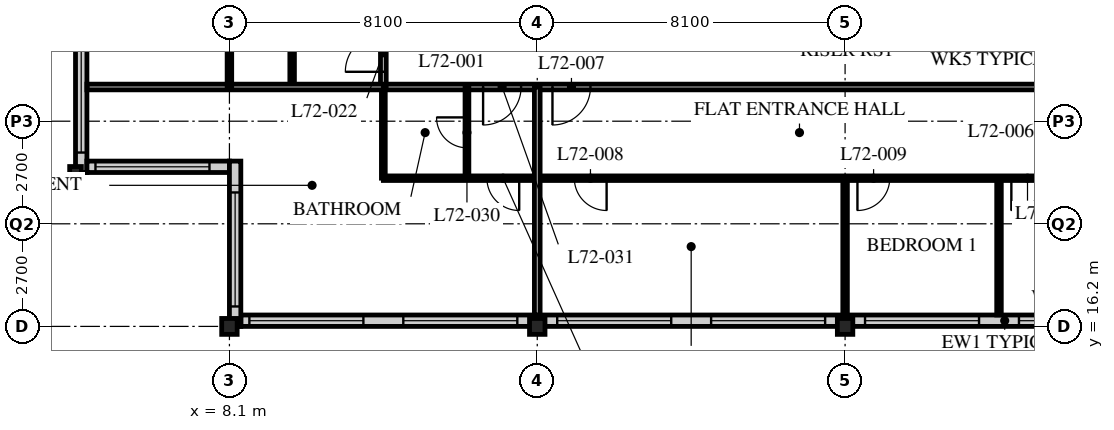
"""IFC4 building model, lengths in metres.
Left out: names, types, materials, properties, quantities, classifications, styles, units other than length and angle.
Written with IfcOpenShell. Run it as: python <this file> out.ifc"""

import sys

from ifc_helpers import new_model, si_unit, direction, frame, frame_2d, origin, origin_2d, place, context, subcontext, project, spatial, rectangle, i_section, extrude, element, fill, save


model = new_model("IFC4")
c1 = context("Model", 3, precision=1e-05, world=origin(), true_north=direction((0.0, 1.0)))
c2 = subcontext(c1, "Body", "Model", "MODEL_VIEW")
j1 = project(units=[si_unit("LENGTHUNIT", "METRE"), si_unit("PLANEANGLEUNIT", "RADIAN")], contexts=[c1])
p1 = place(None, origin())
s1 = spatial("IfcSite", under=j1, at=p1, CompositionType="ELEMENT")
p2 = place(p1, origin())
s2 = spatial("IfcBuilding", under=s1, at=p2, CompositionType="ELEMENT")
p3 = place(p2, frame((0.0, 0.0, 281.4)))
s3 = spatial("IfcBuildingStorey", under=s2, at=p3, CompositionType="ELEMENT", Elevation=281.4)
p4 = place(p3, frame((4.05, 20.25, 0.0), z_axis=(0.0, 0.0, 1.0), x_axis=(1.0, 0.0, 0.0)))
e1 = element("IfcColumn", 1, at=p4, inside=s3, PredefinedType="COLUMN", context=c2, shape_type="SweptSolid", body=[
    extrude(i_section(OverallWidth=0.307, OverallDepth=0.314, WebThickness=0.012, FlangeThickness=0.019, FilletRadius=0.015, at=origin_2d()), origin(), (0.0, 0.0, 1.0), 3.9),
])
for number, where, z_axis, x_axis in (
    (2, (8.1, 16.2, 0.0), (0.0, 0.0, 1.0), (1.0, 0.0, 0.0)),
    (3, (16.2, 16.2, 0.0), (0.0, 0.0, 1.0), (1.0, 0.0, 0.0)),
    (4, (24.3, 16.2, 0.0), (0.0, 0.0, 1.0), (1.0, 0.0, 0.0)),
):
    element("IfcColumn", number, at=place(p3, frame(where, z_axis=z_axis, x_axis=x_axis)), inside=s3, PredefinedType="COLUMN", context=c2, shape_type="SweptSolid", body=[
        extrude(i_section(OverallWidth=0.407, OverallDepth=0.419, WebThickness=0.031, FlangeThickness=0.049, FilletRadius=0.015, at=origin_2d()), origin(), (0.0, 0.0, 1.0), 3.9),
    ])
p5 = place(p3, frame((8.4, 16.35, 0.0), z_axis=(0.0, 0.0, 1.0), x_axis=(1.0, 0.0, 0.0)))
e5 = element("IfcWall", 5, at=p5, inside=s3, PredefinedType="SOLIDWALL", context=c2, shape_type="SweptSolid", body=[
    extrude(rectangle(XDim=40.2, YDim=0.3, at=frame_2d((20.1, 0.0))), origin(), (0.0, 0.0, 1.0), 3.69),
])
p6 = place(p5, frame((0.225, 0.0, 0.6)))
e6 = element("IfcOpeningElement", 6, at=p6, cuts=e5, PredefinedType="OPENING", context=c2, shape_type="SweptSolid", body=[
    extrude(rectangle(XDim=3.0, YDim=2.4, at=frame_2d((1.5, 1.2))), frame((0.0, 0.16, 0.0), z_axis=(0.0, -1.0, 0.0), x_axis=(1.0, 0.0, 0.0)), (0.0, 0.0, 1.0), 0.32),
])
p7 = place(p5, frame((4.275, 0.0, 0.6)))
e7 = element("IfcOpeningElement", 7, at=p7, cuts=e5, PredefinedType="OPENING", context=c2, shape_type="SweptSolid", body=[
    extrude(rectangle(XDim=3.0, YDim=2.4, at=frame_2d((1.5, 1.2))), frame((0.0, 0.16, 0.0), z_axis=(0.0, -1.0, 0.0), x_axis=(1.0, 0.0, 0.0)), (0.0, 0.0, 1.0), 0.32),
])
p8 = place(p5, frame((8.325, 0.0, 0.6)))
e8 = element("IfcOpeningElement", 8, at=p8, cuts=e5, PredefinedType="OPENING", context=c2, shape_type="SweptSolid", body=[
    extrude(rectangle(XDim=3.0, YDim=2.4, at=frame_2d((1.5, 1.2))), frame((0.0, 0.16, 0.0), z_axis=(0.0, -1.0, 0.0), x_axis=(1.0, 0.0, 0.0)), (0.0, 0.0, 1.0), 0.32),
])
p9 = place(p5, frame((12.375, 0.0, 0.6)))
e9 = element("IfcOpeningElement", 9, at=p9, cuts=e5, PredefinedType="OPENING", context=c2, shape_type="SweptSolid", body=[
    extrude(rectangle(XDim=3.0, YDim=2.4, at=frame_2d((1.5, 1.2))), frame((0.0, 0.16, 0.0), z_axis=(0.0, -1.0, 0.0), x_axis=(1.0, 0.0, 0.0)), (0.0, 0.0, 1.0), 0.32),
])
p10 = place(p5, frame((16.425, 0.0, 0.6)))
e10 = element("IfcOpeningElement", 10, at=p10, cuts=e5, PredefinedType="OPENING", context=c2, shape_type="SweptSolid", body=[
    extrude(rectangle(XDim=3.0, YDim=2.4, at=frame_2d((1.5, 1.2))), frame((0.0, 0.16, 0.0), z_axis=(0.0, -1.0, 0.0), x_axis=(1.0, 0.0, 0.0)), (0.0, 0.0, 1.0), 0.32),
])
p11 = place(p5, frame((20.475, 0.0, 0.6)))
e11 = element("IfcOpeningElement", 11, at=p11, cuts=e5, PredefinedType="OPENING", context=c2, shape_type="SweptSolid", body=[
    extrude(rectangle(XDim=3.0, YDim=2.4, at=frame_2d((1.5, 1.2))), frame((0.0, 0.16, 0.0), z_axis=(0.0, -1.0, 0.0), x_axis=(1.0, 0.0, 0.0)), (0.0, 0.0, 1.0), 0.32),
])
p12 = place(p5, frame((24.525, 0.0, 0.6)))
e12 = element("IfcOpeningElement", 12, at=p12, cuts=e5, PredefinedType="OPENING", context=c2, shape_type="SweptSolid", body=[
    extrude(rectangle(XDim=3.0, YDim=2.4, at=frame_2d((1.5, 1.2))), frame((0.0, 0.16, 0.0), z_axis=(0.0, -1.0, 0.0), x_axis=(1.0, 0.0, 0.0)), (0.0, 0.0, 1.0), 0.32),
])
p13 = place(p5, frame((28.575, 0.0, 0.6)))
e13 = element("IfcOpeningElement", 13, at=p13, cuts=e5, PredefinedType="OPENING", context=c2, shape_type="SweptSolid", body=[
    extrude(rectangle(XDim=3.0, YDim=2.4, at=frame_2d((1.5, 1.2))), frame((0.0, 0.16, 0.0), z_axis=(0.0, -1.0, 0.0), x_axis=(1.0, 0.0, 0.0)), (0.0, 0.0, 1.0), 0.32),
])
p14 = place(p5, frame((32.625, 0.0, 0.6)))
e14 = element("IfcOpeningElement", 14, at=p14, cuts=e5, PredefinedType="OPENING", context=c2, shape_type="SweptSolid", body=[
    extrude(rectangle(XDim=3.0, YDim=2.4, at=frame_2d((1.5, 1.2))), frame((0.0, 0.16, 0.0), z_axis=(0.0, -1.0, 0.0), x_axis=(1.0, 0.0, 0.0)), (0.0, 0.0, 1.0), 0.32),
])
p15 = place(p5, frame((36.675, 0.0, 0.6)))
e15 = element("IfcOpeningElement", 15, at=p15, cuts=e5, PredefinedType="OPENING", context=c2, shape_type="SweptSolid", body=[
    extrude(rectangle(XDim=3.0, YDim=2.4, at=frame_2d((1.5, 1.2))), frame((0.0, 0.16, 0.0), z_axis=(0.0, -1.0, 0.0), x_axis=(1.0, 0.0, 0.0)), (0.0, 0.0, 1.0), 0.32),
])
p16 = place(p3, frame((4.2, 24.6, 0.0), z_axis=(0.0, 0.0, 1.0), x_axis=(0.0, -1.0, 0.0)))
e16 = element("IfcWall", 16, at=p16, inside=s3, PredefinedType="SOLIDWALL", context=c2, shape_type="SweptSolid", body=[
    extrude(rectangle(XDim=4.35, YDim=0.3, at=frame_2d((2.175, 0.0))), origin(), (0.0, 0.0, 1.0), 3.69),
])
p17 = place(p16, frame((0.825, 0.0, 0.6)))
e17 = element("IfcOpeningElement", 17, at=p17, cuts=e16, PredefinedType="OPENING", context=c2, shape_type="SweptSolid", body=[
    extrude(rectangle(XDim=3.0, YDim=2.3, at=frame_2d((1.5, 1.15))), frame((0.0, 0.16, 0.0), z_axis=(0.0, -1.0, 0.0), x_axis=(1.0, 0.0, 0.0)), (0.0, 0.0, 1.0), 0.32),
])
p18 = place(p3, frame((4.35, 20.4, 0.0), z_axis=(0.0, 0.0, 1.0), x_axis=(1.0, 0.0, 0.0)))
e18 = element("IfcWall", 18, at=p18, inside=s3, PredefinedType="SOLIDWALL", context=c2, shape_type="SweptSolid", body=[
    extrude(rectangle(XDim=3.75, YDim=0.3, at=frame_2d((1.875, 0.0))), origin(), (0.0, 0.0, 1.0), 3.69),
])
p19 = place(p18, frame((0.225, 0.0, 0.6)))
e19 = element("IfcOpeningElement", 19, at=p19, cuts=e18, PredefinedType="OPENING", context=c2, shape_type="SweptSolid", body=[
    extrude(rectangle(XDim=3.0, YDim=2.3, at=frame_2d((1.5, 1.15))), frame((0.0, 0.16, 0.0), z_axis=(0.0, -1.0, 0.0), x_axis=(1.0, 0.0, 0.0)), (0.0, 0.0, 1.0), 0.32),
])
p20 = place(p3, frame((8.25, 20.55, 0.0), z_axis=(0.0, 0.0, 1.0), x_axis=(0.0, -1.0, 0.0)))
e20 = element("IfcWall", 20, at=p20, inside=s3, PredefinedType="SOLIDWALL", context=c2, shape_type="SweptSolid", body=[
    extrude(rectangle(XDim=4.35, YDim=0.3, at=frame_2d((2.175, 0.0))), origin(), (0.0, 0.0, 1.0), 3.69),
])
p21 = place(p20, frame((0.825, 0.0, 0.6)))
e21 = element("IfcOpeningElement", 21, at=p21, cuts=e20, PredefinedType="OPENING", context=c2, shape_type="SweptSolid", body=[
    extrude(rectangle(XDim=3.0, YDim=2.3, at=frame_2d((1.5, 1.15))), frame((0.0, 0.16, 0.0), z_axis=(0.0, -1.0, 0.0), x_axis=(1.0, 0.0, 0.0)), (0.0, 0.0, 1.0), 0.32),
])
p22 = place(p3, frame((12.15, 22.5, 0.0), z_axis=(0.0, 0.0, 1.0), x_axis=(1.0, 0.0, 0.0)))
e22 = element("IfcWall", 22, at=p22, inside=s3, PredefinedType="PARTITIONING", context=c2, shape_type="SweptSolid", body=[
    extrude(rectangle(XDim=24.3, YDim=0.15, at=frame_2d((12.15, 0.0))), origin(), (0.0, 0.0, 1.0), 3.69),
])
p23 = place(p22, frame((4.45, 0.0, 0.0)))
e23 = element("IfcOpeningElement", 23, at=p23, cuts=e22, PredefinedType="OPENING", context=c2, shape_type="SweptSolid", body=[
    extrude(rectangle(XDim=1.0, YDim=2.1, at=frame_2d((0.5, 1.05))), frame((0.0, 0.085, 0.0), z_axis=(0.0, -1.0, 0.0), x_axis=(1.0, 0.0, 0.0)), (0.0, 0.0, 1.0), 0.17),
])
p24 = place(p22, frame((22.6, 0.0, 0.0)))
e24 = element("IfcOpeningElement", 24, at=p24, cuts=e22, PredefinedType="OPENING", context=c2, shape_type="SweptSolid", body=[
    extrude(rectangle(XDim=1.0, YDim=2.1, at=frame_2d((0.5, 1.05))), frame((0.0, 0.085, 0.0), z_axis=(0.0, -1.0, 0.0), x_axis=(1.0, 0.0, 0.0)), (0.0, 0.0, 1.0), 0.17),
])
p25 = place(p22, frame((2.625, 0.0, 0.0)))
e25 = element("IfcOpeningElement", 25, at=p25, cuts=e22, PredefinedType="OPENING", context=c2, shape_type="SweptSolid", body=[
    extrude(rectangle(XDim=1.0, YDim=2.1, at=frame_2d((0.5, 1.05))), frame((0.0, 0.085, 0.0), z_axis=(0.0, -1.0, 0.0), x_axis=(1.0, 0.0, 0.0)), (0.0, 0.0, 1.0), 0.17),
])
p26 = place(p3, frame((12.15, 22.5, 0.0), z_axis=(0.0, 0.0, 1.0), x_axis=(0.0, 1.0, 0.0)))
e26 = element("IfcWall", 26, at=p26, inside=s3, PredefinedType="PARTITIONING", context=c2, shape_type="SweptSolid", body=[
    extrude(rectangle(XDim=26.1, YDim=0.15, at=frame_2d((13.05, 0.0))), origin(), (0.0, 0.0, 1.0), 3.69),
])
p27 = place(p26, frame((0.4, 0.0, 0.0)))
e27 = element("IfcOpeningElement", 27, at=p27, cuts=e26, PredefinedType="OPENING", context=c2, shape_type="SweptSolid", body=[
    extrude(rectangle(XDim=1.0, YDim=2.1, at=frame_2d((0.5, 1.05))), frame((0.0, 0.085, 0.0), z_axis=(0.0, -1.0, 0.0), x_axis=(1.0, 0.0, 0.0)), (0.0, 0.0, 1.0), 0.17),
])
p28 = place(p3, frame((24.3, 20.1, 0.0), z_axis=(0.0, 0.0, 1.0), x_axis=(0.0, -1.0, 0.0)))
e28 = element("IfcWall", 28, at=p28, inside=s3, PredefinedType="PARTITIONING", context=c2, shape_type="SweptSolid", body=[
    extrude(rectangle(XDim=3.6, YDim=0.12, at=frame_2d((1.8, 0.0))), origin(), (0.0, 0.0, 1.0), 3.078),
])
p29 = place(p3, frame((28.35, 20.1, 0.0), z_axis=(0.0, 0.0, 1.0), x_axis=(0.0, -1.0, 0.0)))
e29 = element("IfcWall", 29, at=p29, inside=s3, PredefinedType="PARTITIONING", context=c2, shape_type="SweptSolid", body=[
    extrude(rectangle(XDim=3.6, YDim=0.12, at=frame_2d((1.8, 0.0))), origin(), (0.0, 0.0, 1.0), 3.69),
])
p30 = place(p3, frame((9.75, 22.5, 0.0), z_axis=(0.0, 0.0, 1.0), x_axis=(0.0, 1.0, 0.0)))
e30 = element("IfcWall", 30, at=p30, inside=s3, PredefinedType="PARTITIONING", context=c2, shape_type="SweptSolid", body=[
    extrude(rectangle(XDim=26.1, YDim=0.12, at=frame_2d((13.05, 0.0))), origin(), (0.0, 0.0, 1.0), 3.69),
])
p31 = place(p30, frame((0.975, 0.0, 0.0)))
e31 = element("IfcOpeningElement", 31, at=p31, cuts=e30, PredefinedType="OPENING", context=c2, shape_type="SweptSolid", body=[
    extrude(rectangle(XDim=0.85, YDim=2.1, at=frame_2d((0.425, 1.05))), frame((0.0, 0.07, 0.0), z_axis=(0.0, -1.0, 0.0), x_axis=(1.0, 0.0, 0.0)), (0.0, 0.0, 1.0), 0.14),
])
p32 = place(p30, frame((10.225, 0.0, 0.0)))
e32 = element("IfcOpeningElement", 32, at=p32, cuts=e30, PredefinedType="OPENING", context=c2, shape_type="SweptSolid", body=[
    extrude(rectangle(XDim=0.85, YDim=2.1, at=frame_2d((0.425, 1.05))), frame((0.0, 0.07, 0.0), z_axis=(0.0, -1.0, 0.0), x_axis=(1.0, 0.0, 0.0)), (0.0, 0.0, 1.0), 0.14),
])
p33 = place(p30, frame((14.275, 0.0, 0.0)))
e33 = element("IfcOpeningElement", 33, at=p33, cuts=e30, PredefinedType="OPENING", context=c2, shape_type="SweptSolid", body=[
    extrude(rectangle(XDim=0.85, YDim=2.1, at=frame_2d((0.425, 1.05))), frame((0.0, 0.07, 0.0), z_axis=(0.0, -1.0, 0.0), x_axis=(1.0, 0.0, 0.0)), (0.0, 0.0, 1.0), 0.14),
])
p34 = place(p30, frame((18.325, 0.0, 0.0)))
e34 = element("IfcOpeningElement", 34, at=p34, cuts=e30, PredefinedType="OPENING", context=c2, shape_type="SweptSolid", body=[
    extrude(rectangle(XDim=0.85, YDim=2.1, at=frame_2d((0.425, 1.05))), frame((0.0, 0.07, 0.0), z_axis=(0.0, -1.0, 0.0), x_axis=(1.0, 0.0, 0.0)), (0.0, 0.0, 1.0), 0.14),
])
p35 = place(p30, frame((22.375, 0.0, 0.0)))
e35 = element("IfcOpeningElement", 35, at=p35, cuts=e30, PredefinedType="OPENING", context=c2, shape_type="SweptSolid", body=[
    extrude(rectangle(XDim=0.85, YDim=2.1, at=frame_2d((0.425, 1.05))), frame((0.0, 0.07, 0.0), z_axis=(0.0, -1.0, 0.0), x_axis=(1.0, 0.0, 0.0)), (0.0, 0.0, 1.0), 0.14),
])
p36 = place(p3, frame((12.15, 20.1, 0.0), z_axis=(0.0, 0.0, 1.0), x_axis=(1.0, 0.0, 0.0)))
e36 = element("IfcWall", 36, at=p36, inside=s3, PredefinedType="PARTITIONING", context=c2, shape_type="SweptSolid", body=[
    extrude(rectangle(XDim=20.25, YDim=0.12, at=frame_2d((10.125, 0.0))), origin(), (0.0, 0.0, 1.0), 3.69),
])
p37 = place(p36, frame((5.025, 0.0, 0.0)))
e37 = element("IfcOpeningElement", 37, at=p37, cuts=e36, PredefinedType="OPENING", context=c2, shape_type="SweptSolid", body=[
    extrude(rectangle(XDim=0.85, YDim=2.1, at=frame_2d((0.425, 1.05))), frame((0.0, 0.07, 0.0), z_axis=(0.0, -1.0, 0.0), x_axis=(1.0, 0.0, 0.0)), (0.0, 0.0, 1.0), 0.14),
])
p38 = place(p36, frame((12.475, 0.0, 0.0)))
e38 = element("IfcOpeningElement", 38, at=p38, cuts=e36, PredefinedType="OPENING", context=c2, shape_type="SweptSolid", body=[
    extrude(rectangle(XDim=0.85, YDim=2.1, at=frame_2d((0.425, 1.05))), frame((0.0, 0.07, 0.0), z_axis=(0.0, -1.0, 0.0), x_axis=(1.0, 0.0, 0.0)), (0.0, 0.0, 1.0), 0.14),
])
p39 = place(p36, frame((16.525, 0.0, 0.0)))
e39 = element("IfcOpeningElement", 39, at=p39, cuts=e36, PredefinedType="OPENING", context=c2, shape_type="SweptSolid", body=[
    extrude(rectangle(XDim=0.85, YDim=2.1, at=frame_2d((0.425, 1.05))), frame((0.0, 0.07, 0.0), z_axis=(0.0, -1.0, 0.0), x_axis=(1.0, 0.0, 0.0)), (0.0, 0.0, 1.0), 0.14),
])
p40 = place(p36, frame((2.725, 0.0, 0.0)))
e40 = element("IfcOpeningElement", 40, at=p40, cuts=e36, PredefinedType="OPENING", context=c2, shape_type="SweptSolid", body=[
    extrude(rectangle(XDim=0.85, YDim=2.1, at=frame_2d((0.425, 1.05))), frame((0.0, 0.07, 0.0), z_axis=(0.0, -1.0, 0.0), x_axis=(1.0, 0.0, 0.0)), (0.0, 0.0, 1.0), 0.14),
])
p41 = place(p3, frame((14.35, 22.5, 0.0), z_axis=(0.0, 0.0, 1.0), x_axis=(0.0, -1.0, 0.0)))
e41 = element("IfcWall", 41, at=p41, inside=s3, PredefinedType="PARTITIONING", context=c2, shape_type="SweptSolid", body=[
    extrude(rectangle(XDim=2.4, YDim=0.1, at=frame_2d((1.2, 0.0))), origin(), (0.0, 0.0, 1.0), 3.69),
])
p42 = place(p41, frame((0.8, 0.0, 0.0)))
e42 = element("IfcOpeningElement", 42, at=p42, cuts=e41, PredefinedType="OPENING", context=c2, shape_type="SweptSolid", body=[
    extrude(rectangle(XDim=0.8, YDim=2.1, at=frame_2d((0.4, 1.05))), frame((0.0, 0.06, 0.0), z_axis=(0.0, -1.0, 0.0), x_axis=(1.0, 0.0, 0.0)), (0.0, 0.0, 1.0), 0.12),
])
p43 = place(p3, frame((12.15, 22.5, 0.0), z_axis=(0.0, 0.0, 1.0), x_axis=(0.0, -1.0, 0.0)))
e43 = element("IfcWall", 43, at=p43, inside=s3, PredefinedType="PARTITIONING", context=c2, shape_type="SweptSolid", body=[
    extrude(rectangle(XDim=2.4, YDim=0.1, at=frame_2d((1.2, 0.0))), origin(), (0.0, 0.0, 1.0), 3.69),
])
p44 = place(p3, frame((4.35, 22.5, 0.0), z_axis=(0.0, 0.0, 1.0), x_axis=(1.0, 0.0, 0.0)))
e44 = element("IfcWall", 44, at=p44, inside=s3, PredefinedType="PARTITIONING", context=c2, shape_type="SweptSolid", body=[
    extrude(rectangle(XDim=7.8, YDim=0.15, at=frame_2d((3.9, 0.0))), origin(), (0.0, 0.0, 1.0), 3.69),
])
p45 = place(p3, frame((16.2, 22.5, 0.0), z_axis=(0.0, 0.0, 1.0), x_axis=(0.0, -1.0, 0.0)))
e45 = element("IfcWall", 45, at=p45, inside=s3, PredefinedType="PARTITIONING", context=c2, shape_type="SweptSolid", body=[
    extrude(rectangle(XDim=6.0, YDim=0.15, at=frame_2d((3.0, 0.0))), origin(), (0.0, 0.0, 1.0), 3.078),
])
p46 = place(p3, frame((8.1, 22.5, 0.0), z_axis=(0.0, 0.0, 1.0), x_axis=(0.0, 1.0, 0.0)))
e46 = element("IfcWall", 46, at=p46, inside=s3, PredefinedType="PARTITIONING", context=c2, shape_type="SweptSolid", body=[
    extrude(rectangle(XDim=1.597, YDim=0.12, at=frame_2d((0.798, 0.0))), origin(), (0.0, 0.0, 1.0), 3.078),
])
p47 = place(p6, origin())
e47 = element("IfcWindow", 47, at=p47, inside=s3, PartitioningType="SINGLE_PANEL", PredefinedType="WINDOW", context=c2, shape_type="SweptSolid", body=[
    extrude(rectangle(XDim=3.0, YDim=2.4, at=frame_2d((1.5, 1.2))), frame((0.0, 0.03, 0.0), z_axis=(0.0, -1.0, 0.0), x_axis=(1.0, 0.0, 0.0)), (0.0, 0.0, 1.0), 0.06),
])
fill(e6, e47)
p48 = place(p7, origin())
e48 = element("IfcWindow", 48, at=p48, inside=s3, PartitioningType="SINGLE_PANEL", PredefinedType="WINDOW", context=c2, shape_type="SweptSolid", body=[
    extrude(rectangle(XDim=3.0, YDim=2.4, at=frame_2d((1.5, 1.2))), frame((0.0, 0.03, 0.0), z_axis=(0.0, -1.0, 0.0), x_axis=(1.0, 0.0, 0.0)), (0.0, 0.0, 1.0), 0.06),
])
fill(e7, e48)
p49 = place(p8, origin())
e49 = element("IfcWindow", 49, at=p49, inside=s3, PartitioningType="SINGLE_PANEL", PredefinedType="WINDOW", context=c2, shape_type="SweptSolid", body=[
    extrude(rectangle(XDim=3.0, YDim=2.4, at=frame_2d((1.5, 1.2))), frame((0.0, 0.03, 0.0), z_axis=(0.0, -1.0, 0.0), x_axis=(1.0, 0.0, 0.0)), (0.0, 0.0, 1.0), 0.06),
])
fill(e8, e49)
p50 = place(p9, origin())
e50 = element("IfcWindow", 50, at=p50, inside=s3, PartitioningType="SINGLE_PANEL", PredefinedType="WINDOW", context=c2, shape_type="SweptSolid", body=[
    extrude(rectangle(XDim=3.0, YDim=2.4, at=frame_2d((1.5, 1.2))), frame((0.0, 0.03, 0.0), z_axis=(0.0, -1.0, 0.0), x_axis=(1.0, 0.0, 0.0)), (0.0, 0.0, 1.0), 0.06),
])
fill(e9, e50)
p51 = place(p10, origin())
e51 = element("IfcWindow", 51, at=p51, inside=s3, PartitioningType="SINGLE_PANEL", PredefinedType="WINDOW", context=c2, shape_type="SweptSolid", body=[
    extrude(rectangle(XDim=3.0, YDim=2.4, at=frame_2d((1.5, 1.2))), frame((0.0, 0.03, 0.0), z_axis=(0.0, -1.0, 0.0), x_axis=(1.0, 0.0, 0.0)), (0.0, 0.0, 1.0), 0.06),
])
fill(e10, e51)
p52 = place(p11, origin())
e52 = element("IfcWindow", 52, at=p52, inside=s3, PartitioningType="SINGLE_PANEL", PredefinedType="WINDOW", context=c2, shape_type="SweptSolid", body=[
    extrude(rectangle(XDim=3.0, YDim=2.4, at=frame_2d((1.5, 1.2))), frame((0.0, 0.03, 0.0), z_axis=(0.0, -1.0, 0.0), x_axis=(1.0, 0.0, 0.0)), (0.0, 0.0, 1.0), 0.06),
])
fill(e11, e52)
p53 = place(p17, origin())
e53 = element("IfcWindow", 53, at=p53, inside=s3, PartitioningType="SINGLE_PANEL", PredefinedType="WINDOW", context=c2, shape_type="SweptSolid", body=[
    extrude(rectangle(XDim=3.0, YDim=2.3, at=frame_2d((1.5, 1.15))), frame((0.0, 0.03, 0.0), z_axis=(0.0, -1.0, 0.0), x_axis=(1.0, 0.0, 0.0)), (0.0, 0.0, 1.0), 0.06),
])
fill(e17, e53)
p54 = place(p19, origin())
e54 = element("IfcWindow", 54, at=p54, inside=s3, PartitioningType="SINGLE_PANEL", PredefinedType="WINDOW", context=c2, shape_type="SweptSolid", body=[
    extrude(rectangle(XDim=3.0, YDim=2.3, at=frame_2d((1.5, 1.15))), frame((0.0, 0.03, 0.0), z_axis=(0.0, -1.0, 0.0), x_axis=(1.0, 0.0, 0.0)), (0.0, 0.0, 1.0), 0.06),
])
fill(e19, e54)
p55 = place(p21, origin())
e55 = element("IfcWindow", 55, at=p55, inside=s3, PartitioningType="SINGLE_PANEL", PredefinedType="WINDOW", context=c2, shape_type="SweptSolid", body=[
    extrude(rectangle(XDim=3.0, YDim=2.3, at=frame_2d((1.5, 1.15))), frame((0.0, 0.03, 0.0), z_axis=(0.0, -1.0, 0.0), x_axis=(1.0, 0.0, 0.0)), (0.0, 0.0, 1.0), 0.06),
])
fill(e21, e55)
p56 = place(p23, origin())
e56 = element("IfcDoor", 56, at=p56, inside=s3, OperationType="SINGLE_SWING_RIGHT", PredefinedType="DOOR", context=c2, shape_type="SweptSolid", body=[
    extrude(rectangle(XDim=1.0, YDim=2.1, at=frame_2d((0.5, 1.05))), frame((0.0, 0.025, 0.0), z_axis=(0.0, -1.0, 0.0), x_axis=(1.0, 0.0, 0.0)), (0.0, 0.0, 1.0), 0.05),
])
fill(e23, e56)
p57 = place(p37, origin())
e57 = element("IfcDoor", 57, at=p57, inside=s3, OperationType="SINGLE_SWING_LEFT", PredefinedType="DOOR", context=c2, shape_type="SweptSolid", body=[
    extrude(rectangle(XDim=0.85, YDim=2.1, at=frame_2d((0.425, 1.05))), frame((0.0, 0.025, 0.0), z_axis=(0.0, -1.0, 0.0), x_axis=(1.0, 0.0, 0.0)), (0.0, 0.0, 1.0), 0.05),
])
fill(e37, e57)
p58 = place(p38, origin())
e58 = element("IfcDoor", 58, at=p58, inside=s3, OperationType="SINGLE_SWING_RIGHT", PredefinedType="DOOR", context=c2, shape_type="SweptSolid", body=[
    extrude(rectangle(XDim=0.85, YDim=2.1, at=frame_2d((0.425, 1.05))), frame((0.0, 0.025, 0.0), z_axis=(0.0, -1.0, 0.0), x_axis=(1.0, 0.0, 0.0)), (0.0, 0.0, 1.0), 0.05),
])
fill(e38, e58)
p59 = place(p39, origin())
e59 = element("IfcDoor", 59, at=p59, inside=s3, OperationType="SINGLE_SWING_RIGHT", PredefinedType="DOOR", context=c2, shape_type="SweptSolid", body=[
    extrude(rectangle(XDim=0.85, YDim=2.1, at=frame_2d((0.425, 1.05))), frame((0.0, 0.025, 0.0), z_axis=(0.0, -1.0, 0.0), x_axis=(1.0, 0.0, 0.0)), (0.0, 0.0, 1.0), 0.05),
])
fill(e39, e59)
p60 = place(p27, origin())
e60 = element("IfcDoor", 60, at=p60, inside=s3, OperationType="SINGLE_SWING_LEFT", PredefinedType="DOOR", context=c2, shape_type="SweptSolid", body=[
    extrude(rectangle(XDim=1.0, YDim=2.1, at=frame_2d((0.5, 1.05))), frame((0.0, 0.025, 0.0), z_axis=(0.0, -1.0, 0.0), x_axis=(1.0, 0.0, 0.0)), (0.0, 0.0, 1.0), 0.05),
])
fill(e27, e60)
p61 = place(p42, origin())
e61 = element("IfcDoor", 61, at=p61, inside=s3, OperationType="SINGLE_SWING_RIGHT", PredefinedType="DOOR", context=c2, shape_type="SweptSolid", body=[
    extrude(rectangle(XDim=0.8, YDim=2.1, at=frame_2d((0.4, 1.05))), frame((0.0, 0.025, 0.0), z_axis=(0.0, -1.0, 0.0), x_axis=(1.0, 0.0, 0.0)), (0.0, 0.0, 1.0), 0.05),
])
fill(e42, e61)
p62 = place(p25, origin())
e62 = element("IfcDoor", 62, at=p62, inside=s3, OperationType="SINGLE_SWING_RIGHT", PredefinedType="DOOR", context=c2, shape_type="SweptSolid", body=[
    extrude(rectangle(XDim=1.0, YDim=2.1, at=frame_2d((0.5, 1.05))), frame((0.0, 0.025, 0.0), z_axis=(0.0, -1.0, 0.0), x_axis=(1.0, 0.0, 0.0)), (0.0, 0.0, 1.0), 0.05),
])
fill(e25, e62)
p63 = place(p40, origin())
e63 = element("IfcDoor", 63, at=p63, inside=s3, OperationType="SINGLE_SWING_LEFT", PredefinedType="DOOR", context=c2, shape_type="SweptSolid", body=[
    extrude(rectangle(XDim=0.85, YDim=2.1, at=frame_2d((0.425, 1.05))), frame((0.0, 0.025, 0.0), z_axis=(0.0, -1.0, 0.0), x_axis=(1.0, 0.0, 0.0)), (0.0, 0.0, 1.0), 0.05),
])
fill(e40, e63)
save(model, sys.argv[1])
